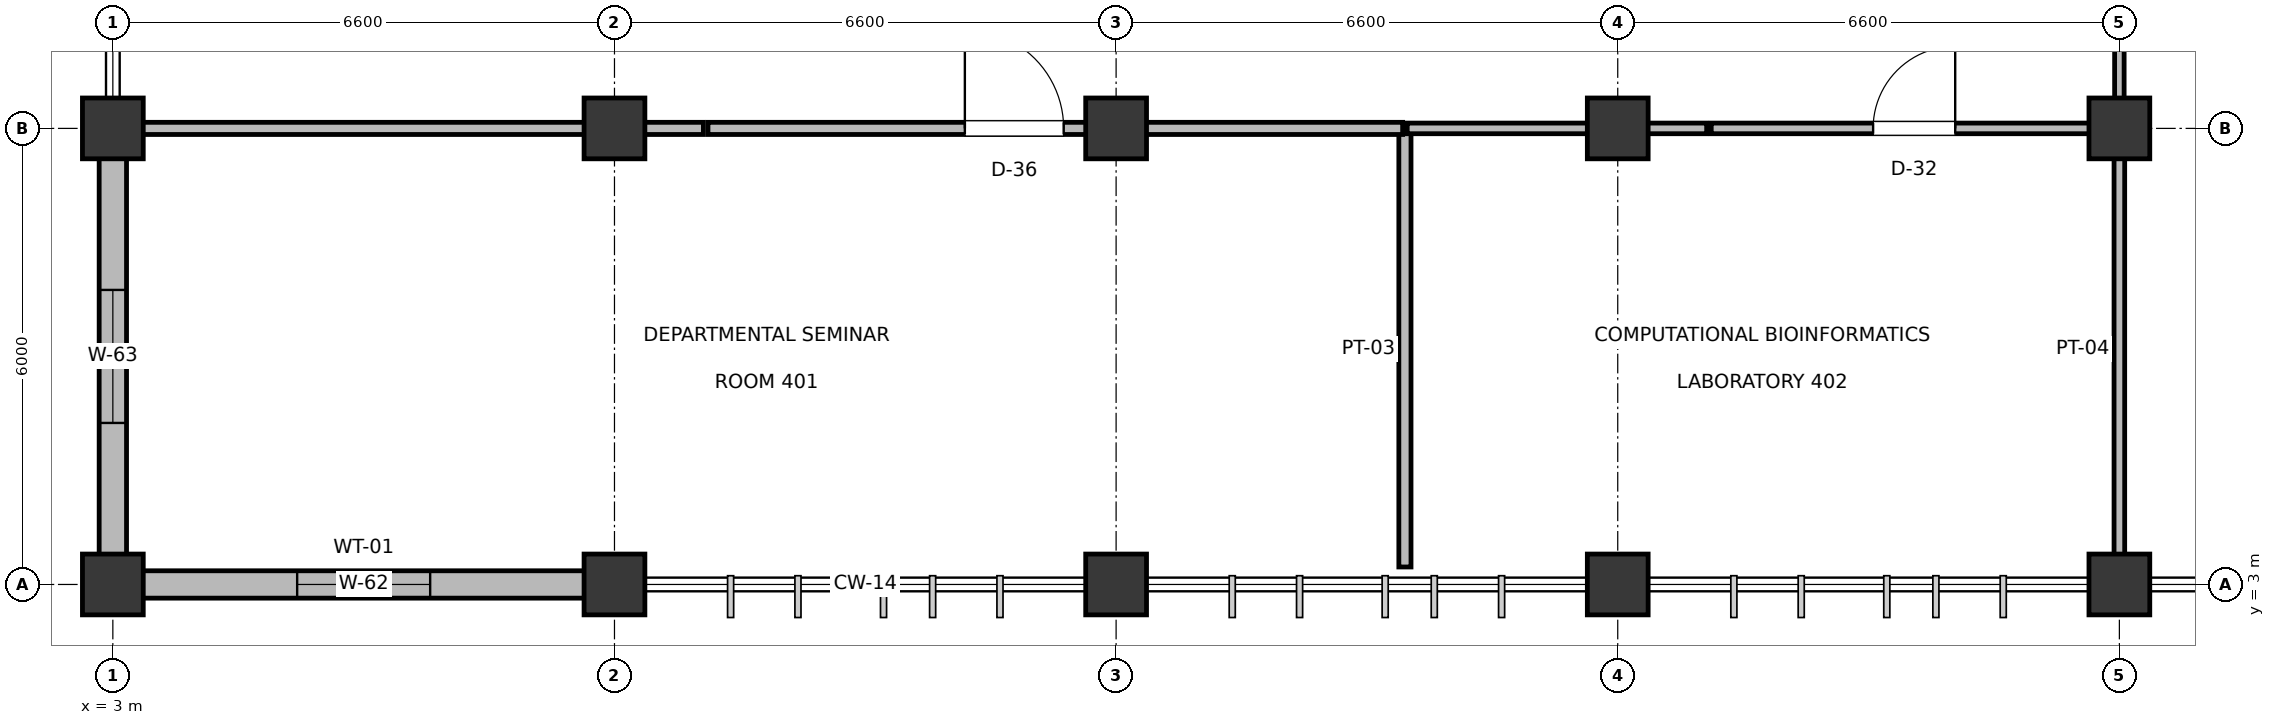
"""IFC4 building model, lengths in metres.
Left out: names, types, materials, properties, quantities, classifications, styles, units other than length and angle.
Written with IfcOpenShell. Run it as: python <this file> out.ifc"""

import sys

from ifc_helpers import new_model, si_unit, direction, frame, frame_2d, origin, origin_2d, place, context, subcontext, project, spatial, rectangle, extrude, element, fill, save


model = new_model("IFC4")
c1 = context("Model", 3, precision=1e-05, world=origin(), true_north=direction((0.0, 1.0)))
c2 = subcontext(c1, "Body", "Model", "MODEL_VIEW")
j1 = project(units=[si_unit("LENGTHUNIT", "METRE"), si_unit("PLANEANGLEUNIT", "RADIAN")], contexts=[c1])
p1 = place(None, origin())
s1 = spatial("IfcSite", under=j1, at=p1, CompositionType="ELEMENT")
p2 = place(p1, origin())
s2 = spatial("IfcBuilding", under=s1, at=p2, CompositionType="ELEMENT")
p3 = place(p2, frame((0.0, 0.0, 19.5)))
s3 = spatial("IfcBuildingStorey", under=s2, at=p3, CompositionType="ELEMENT", Elevation=19.5)
for number, where, z_axis, x_axis in (
    (1, (3.0, 3.0, 0.0), (0.0, 0.0, 1.0), (1.0, 0.0, 0.0)),
    (2, (3.0, 9.0, 0.0), (0.0, 0.0, 1.0), (1.0, 0.0, 0.0)),
    (3, (9.6, 3.0, 0.0), (0.0, 0.0, 1.0), (1.0, 0.0, 0.0)),
    (4, (9.6, 9.0, 0.0), (0.0, 0.0, 1.0), (1.0, 0.0, 0.0)),
    (5, (16.2, 3.0, 0.0), (0.0, 0.0, 1.0), (1.0, 0.0, 0.0)),
    (6, (16.2, 9.0, 0.0), (0.0, 0.0, 1.0), (1.0, 0.0, 0.0)),
    (7, (22.8, 3.0, 0.0), (0.0, 0.0, 1.0), (1.0, 0.0, 0.0)),
    (8, (22.8, 9.0, 0.0), (0.0, 0.0, 1.0), (1.0, 0.0, 0.0)),
    (9, (29.4, 3.0, 0.0), (0.0, 0.0, 1.0), (1.0, 0.0, 0.0)),
    (10, (29.4, 9.0, 0.0), (0.0, 0.0, 1.0), (1.0, 0.0, 0.0)),
):
    element("IfcColumn", number, at=place(p3, frame(where, z_axis=z_axis, x_axis=x_axis)), inside=s3, PredefinedType="COLUMN", context=c2, shape_type="SweptSolid", body=[
        extrude(rectangle(XDim=0.8, YDim=0.8, at=origin_2d()), origin(), (0.0, 0.0, 1.0), 4.5),
    ])
p4 = place(p3, frame((3.385, 3.0, 0.0), z_axis=(0.0, 0.0, 1.0), x_axis=(1.0, 0.0, 0.0)))
e11 = element("IfcWall", 11, at=p4, inside=s3, PredefinedType="SOLIDWALL", context=c2, shape_type="SweptSolid", body=[
    extrude(rectangle(XDim=5.83, YDim=0.36, at=frame_2d((2.915, 0.0))), origin(), (0.0, 0.0, 1.0), 2.87),
])
p5 = place(p4, frame((2.04, 0.0, 0.9)))
e12 = element("IfcOpeningElement", 12, at=p5, cuts=e11, PredefinedType="OPENING", context=c2, shape_type="SweptSolid", body=[
    extrude(rectangle(XDim=1.75, YDim=1.35, at=frame_2d((0.875, 0.675))), frame((0.0, 0.19, 0.0), z_axis=(0.0, -1.0, 0.0), x_axis=(1.0, 0.0, 0.0)), (0.0, 0.0, 1.0), 0.38),
])
p6 = place(p3, frame((3.0, 3.385, 0.0), z_axis=(0.0, 0.0, 1.0), x_axis=(0.0, 1.0, 0.0)))
e13 = element("IfcWall", 13, at=p6, inside=s3, PredefinedType="SOLIDWALL", context=c2, shape_type="SweptSolid", body=[
    extrude(rectangle(XDim=5.23, YDim=0.36, at=frame_2d((2.615, 0.0))), origin(), (0.0, 0.0, 1.0), 3.575),
])
p7 = place(p6, frame((1.74, 0.0, 0.9)))
e14 = element("IfcOpeningElement", 14, at=p7, cuts=e13, PredefinedType="OPENING", context=c2, shape_type="SweptSolid", body=[
    extrude(rectangle(XDim=1.75, YDim=1.55, at=frame_2d((0.875, 0.775))), frame((0.0, 0.19, 0.0), z_axis=(0.0, -1.0, 0.0), x_axis=(1.0, 0.0, 0.0)), (0.0, 0.0, 1.0), 0.38),
])
p8 = place(p3, frame((20.0, 3.23, 0.0), z_axis=(0.0, 0.0, 1.0), x_axis=(0.0, 1.0, 0.0)))
e15 = element("IfcWall", 15, at=p8, inside=s3, PredefinedType="PARTITIONING", context=c2, shape_type="SweptSolid", body=[
    extrude(rectangle(XDim=5.74, YDim=0.16, at=frame_2d((2.87, 0.0))), origin(), (0.0, 0.0, 1.0), 3.525),
])
p9 = place(p3, frame((3.23, 9.0, 0.0), z_axis=(0.0, 0.0, 1.0), x_axis=(1.0, 0.0, 0.0)))
e16 = element("IfcWall", 16, at=p9, inside=s3, PredefinedType="PARTITIONING", context=c2, shape_type="SweptSolid", body=[
    extrude(rectangle(XDim=7.54, YDim=0.16, at=frame_2d((3.77, 0.0))), origin(), (0.0, 0.0, 1.0), 3.415),
])
p10 = place(p3, frame((10.83, 9.0, 0.0), z_axis=(0.0, 0.0, 1.0), x_axis=(1.0, 0.0, 0.0)))
e17 = element("IfcWall", 17, at=p10, inside=s3, PredefinedType="PARTITIONING", context=c2, shape_type="SweptSolid", body=[
    extrude(rectangle(XDim=9.14, YDim=0.16, at=frame_2d((4.57, 0.0))), origin(), (0.0, 0.0, 1.0), 3.415),
])
p11 = place(p10, frame((3.38, 0.0, 0.0)))
e18 = element("IfcOpeningElement", 18, at=p11, cuts=e17, PredefinedType="OPENING", context=c2, shape_type="SweptSolid", body=[
    extrude(rectangle(XDim=1.3, YDim=2.2, at=frame_2d((0.65, 1.1))), frame((0.0, 0.09, 0.0), z_axis=(0.0, -1.0, 0.0), x_axis=(1.0, 0.0, 0.0)), (0.0, 0.0, 1.0), 0.18),
])
p12 = place(p3, frame((29.4, 3.23, 0.0), z_axis=(0.0, 0.0, 1.0), x_axis=(0.0, 1.0, 0.0)))
e19 = element("IfcWall", 19, at=p12, inside=s3, PredefinedType="PARTITIONING", context=c2, shape_type="SweptSolid", body=[
    extrude(rectangle(XDim=5.74, YDim=0.14, at=frame_2d((2.87, 0.0))), origin(), (0.0, 0.0, 1.0), 3.625),
])
p13 = place(p3, frame((24.03, 9.0, 0.0), z_axis=(0.0, 0.0, 1.0), x_axis=(1.0, 0.0, 0.0)))
e20 = element("IfcWall", 20, at=p13, inside=s3, PredefinedType="PARTITIONING", context=c2, shape_type="SweptSolid", body=[
    extrude(rectangle(XDim=5.34, YDim=0.14, at=frame_2d((2.67, 0.0))), origin(), (0.0, 0.0, 1.0), 3.355),
])
p14 = place(p13, frame((2.13, 0.0, 0.0)))
e21 = element("IfcOpeningElement", 21, at=p14, cuts=e20, PredefinedType="OPENING", context=c2, shape_type="SweptSolid", body=[
    extrude(rectangle(XDim=1.08, YDim=2.15, at=frame_2d((0.54, 1.075))), frame((0.0, 0.08, 0.0), z_axis=(0.0, -1.0, 0.0), x_axis=(1.0, 0.0, 0.0)), (0.0, 0.0, 1.0), 0.16),
])
p15 = place(p3, frame((20.03, 9.0, 0.0), z_axis=(0.0, 0.0, 1.0), x_axis=(1.0, 0.0, 0.0)))
e22 = element("IfcWall", 22, at=p15, inside=s3, PredefinedType="PARTITIONING", context=c2, shape_type="SweptSolid", body=[
    extrude(rectangle(XDim=3.94, YDim=0.14, at=frame_2d((1.97, 0.0))), origin(), (0.0, 0.0, 1.0), 3.355),
])
p16 = place(p3, frame((29.4, 9.03, 0.0), z_axis=(0.0, 0.0, 1.0), x_axis=(0.0, 1.0, 0.0)))
e23 = element("IfcWall", 23, at=p16, inside=s3, PredefinedType="PARTITIONING", context=c2, shape_type="SweptSolid", body=[
    extrude(rectangle(XDim=11.54, YDim=0.125, at=frame_2d((5.77, 0.0))), origin(), (0.0, 0.0, 1.0), 3.425),
])
p17 = place(p16, frame((5.23, 0.0, 0.0)))
e24 = element("IfcOpeningElement", 24, at=p17, cuts=e23, PredefinedType="OPENING", context=c2, shape_type="SweptSolid", body=[
    extrude(rectangle(XDim=1.08, YDim=2.15, at=frame_2d((0.54, 1.075))), frame((0.0, 0.073, 0.0), z_axis=(0.0, -1.0, 0.0), x_axis=(1.0, 0.0, 0.0)), (0.0, 0.0, 1.0), 0.145),
])
p18 = place(p5, frame((1.75, 0.0, 0.0), z_axis=(0.0, 0.0, 1.0), x_axis=(-1.0, 0.0, 0.0)))
e25 = element("IfcWindow", 25, at=p18, inside=s3, PartitioningType="DOUBLE_PANEL_VERTICAL", PredefinedType="WINDOW", context=c2, shape_type="SweptSolid", body=[
    extrude(rectangle(XDim=1.75, YDim=1.35, at=frame_2d((0.875, 0.675))), frame((0.0, 0.03, 0.0), z_axis=(0.0, -1.0, 0.0), x_axis=(1.0, 0.0, 0.0)), (0.0, 0.0, 1.0), 0.06),
])
fill(e12, e25)
p19 = place(p7, origin())
e26 = element("IfcWindow", 26, at=p19, inside=s3, PartitioningType="DOUBLE_PANEL_VERTICAL", PredefinedType="WINDOW", context=c2, shape_type="SweptSolid", body=[
    extrude(rectangle(XDim=1.75, YDim=1.55, at=frame_2d((0.875, 0.775))), frame((0.0, 0.03, 0.0), z_axis=(0.0, -1.0, 0.0), x_axis=(1.0, 0.0, 0.0)), (0.0, 0.0, 1.0), 0.06),
])
fill(e14, e26)
p20 = place(p11, origin())
e27 = element("IfcDoor", 27, at=p20, inside=s3, OperationType="SINGLE_SWING_LEFT", PredefinedType="DOOR", context=c2, shape_type="SweptSolid", body=[
    extrude(rectangle(XDim=1.3, YDim=2.2, at=frame_2d((0.65, 1.1))), frame((0.0, 0.025, 0.0), z_axis=(0.0, -1.0, 0.0), x_axis=(1.0, 0.0, 0.0)), (0.0, 0.0, 1.0), 0.05),
])
fill(e18, e27)
p21 = place(p14, origin())
e28 = element("IfcDoor", 28, at=p21, inside=s3, OperationType="SINGLE_SWING_RIGHT", PredefinedType="DOOR", context=c2, shape_type="SweptSolid", body=[
    extrude(rectangle(XDim=1.08, YDim=2.15, at=frame_2d((0.54, 1.075))), frame((0.0, 0.025, 0.0), z_axis=(0.0, -1.0, 0.0), x_axis=(1.0, 0.0, 0.0)), (0.0, 0.0, 1.0), 0.05),
])
fill(e21, e28)
save(model, sys.argv[1])
